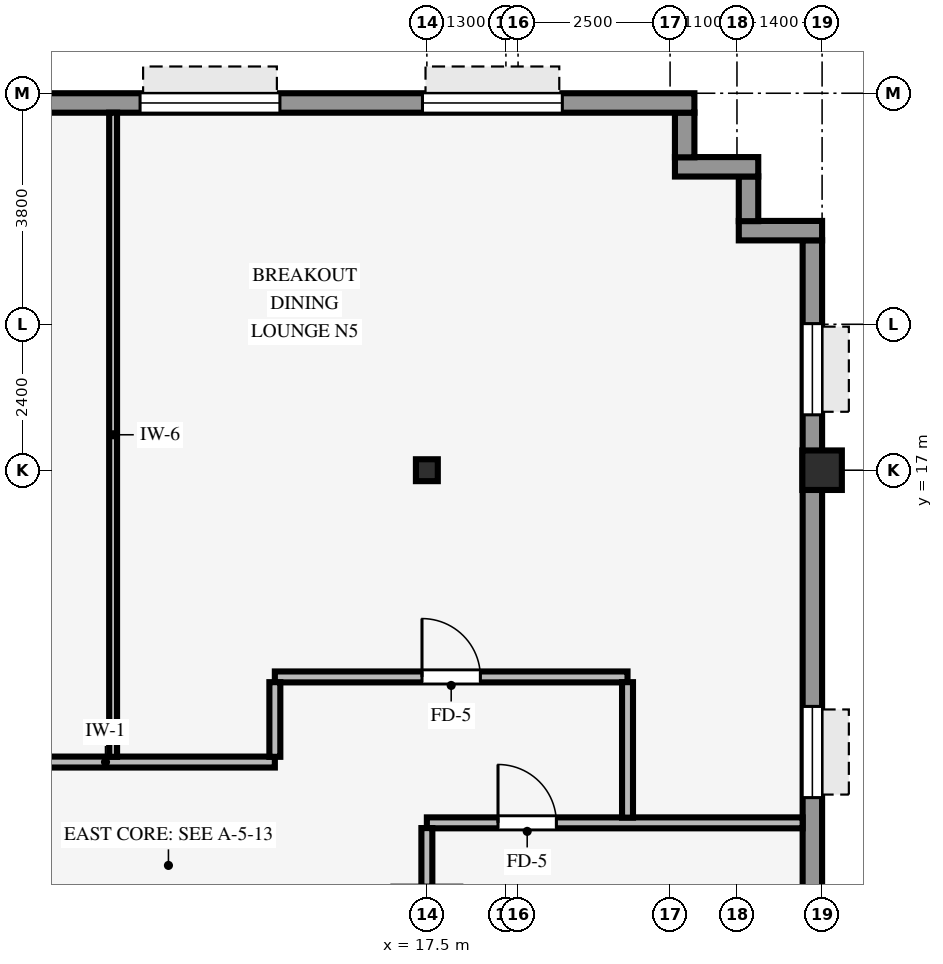
"""IFC4 building model, lengths in metres.
Left out: names, types, materials, properties, quantities, classifications, styles, units other than length and angle.
Written with IfcOpenShell. Run it as: python <this file> out.ifc"""

import sys

from ifc_helpers import new_model, si_unit, direction, frame, frame_2d, origin, origin_2d, place, context, subcontext, project, spatial, rectangle, hollow_rectangle, i_section, extrude, source, transform, mapped, element, fill, save


model = new_model("IFC4")
c1 = context("Model", 3, precision=1e-05, world=origin(), true_north=direction((0.0, 1.0)))
c2 = subcontext(c1, "Body", "Model", "MODEL_VIEW")
j1 = project(units=[si_unit("LENGTHUNIT", "METRE"), si_unit("PLANEANGLEUNIT", "RADIAN")], contexts=[c1])
p1 = place(None, origin())
s1 = spatial("IfcSite", under=j1, at=p1, CompositionType="ELEMENT")
p2 = place(p1, origin())
s2 = spatial("IfcBuilding", under=s1, at=p2, CompositionType="ELEMENT")
p3 = place(p2, frame((0.0, 0.0, 98.3)))
s3 = spatial("IfcBuildingStorey", under=s2, at=p3, CompositionType="ELEMENT", Elevation=98.3)
p4 = place(p3, frame((24.0, 17.0, 0.0), z_axis=(0.0, 0.0, 1.0), x_axis=(1.0, 0.0, 0.0)))
e1 = element("IfcColumn", 1, at=p4, inside=s3, PredefinedType="COLUMN", context=c2, shape_type="SweptSolid", body=[
    extrude(hollow_rectangle(XDim=0.65, YDim=0.65, WallThickness=0.04, InnerFilletRadius=0.04, OuterFilletRadius=0.08, at=origin_2d()), origin(), (0.0, 0.0, 1.0), 3.37),
])
p5 = place(p3, frame((17.5, 17.0, 0.0), z_axis=(0.0, 0.0, 1.0), x_axis=(1.0, 0.0, 0.0)))
e2 = element("IfcColumn", 2, at=p5, inside=s3, PredefinedType="COLUMN", context=c2, shape_type="SweptSolid", body=[
    extrude(i_section(OverallWidth=0.36, OverallDepth=0.36, WebThickness=0.021, FlangeThickness=0.021, FilletRadius=0.018, at=origin_2d()), origin(), (0.0, 0.0, 1.0), 3.37),
])
p6 = place(p3, frame((23.84, -20.784, 0.0), z_axis=(0.0, 0.0, 1.0), x_axis=(0.0, 1.0, 0.0)))
e3 = element("IfcWall", 3, at=p6, inside=s3, PredefinedType="STANDARD", context=c2, shape_type="SweptSolid", body=[
    extrude(rectangle(XDim=41.568, YDim=0.32, at=frame_2d((20.784, 0.0))), origin(), (0.0, 0.0, 1.0), 2.705),
])
p7 = place(p6, frame((1.373, 0.0, 0.8)))
e4 = element("IfcOpeningElement", 4, at=p7, cuts=e3, PredefinedType="OPENING", context=c2, shape_type="SweptSolid", body=[
    extrude(rectangle(XDim=1.5, YDim=1.6, at=frame_2d((0.75, 0.8))), frame((0.0, 0.17, 0.0), z_axis=(0.0, -1.0, 0.0), x_axis=(1.0, 0.0, 0.0)), (0.0, 0.0, 1.0), 0.34),
])
p8 = place(p6, frame((7.669, 0.0, 0.8)))
e5 = element("IfcOpeningElement", 5, at=p8, cuts=e3, PredefinedType="OPENING", context=c2, shape_type="SweptSolid", body=[
    extrude(rectangle(XDim=1.5, YDim=1.6, at=frame_2d((0.75, 0.8))), frame((0.0, 0.17, 0.0), z_axis=(0.0, -1.0, 0.0), x_axis=(1.0, 0.0, 0.0)), (0.0, 0.0, 1.0), 0.34),
])
p9 = place(p6, frame((12.615, 0.0, 0.8)))
e6 = element("IfcOpeningElement", 6, at=p9, cuts=e3, PredefinedType="OPENING", context=c2, shape_type="SweptSolid", body=[
    extrude(rectangle(XDim=1.5, YDim=1.6, at=frame_2d((0.75, 0.8))), frame((0.0, 0.17, 0.0), z_axis=(0.0, -1.0, 0.0), x_axis=(1.0, 0.0, 0.0)), (0.0, 0.0, 1.0), 0.34),
])
p10 = place(p6, frame((17.561, 0.0, 0.8)))
e7 = element("IfcOpeningElement", 7, at=p10, cuts=e3, PredefinedType="OPENING", context=c2, shape_type="SweptSolid", body=[
    extrude(rectangle(XDim=1.5, YDim=1.6, at=frame_2d((0.75, 0.8))), frame((0.0, 0.17, 0.0), z_axis=(0.0, -1.0, 0.0), x_axis=(1.0, 0.0, 0.0)), (0.0, 0.0, 1.0), 0.34),
])
p11 = place(p6, frame((22.507, 0.0, 0.8)))
e8 = element("IfcOpeningElement", 8, at=p11, cuts=e3, PredefinedType="OPENING", context=c2, shape_type="SweptSolid", body=[
    extrude(rectangle(XDim=1.5, YDim=1.6, at=frame_2d((0.75, 0.8))), frame((0.0, 0.17, 0.0), z_axis=(0.0, -1.0, 0.0), x_axis=(1.0, 0.0, 0.0)), (0.0, 0.0, 1.0), 0.34),
])
p12 = place(p6, frame((27.453, 0.0, 0.8)))
e9 = element("IfcOpeningElement", 9, at=p12, cuts=e3, PredefinedType="OPENING", context=c2, shape_type="SweptSolid", body=[
    extrude(rectangle(XDim=1.5, YDim=1.6, at=frame_2d((0.75, 0.8))), frame((0.0, 0.17, 0.0), z_axis=(0.0, -1.0, 0.0), x_axis=(1.0, 0.0, 0.0)), (0.0, 0.0, 1.0), 0.34),
])
p13 = place(p6, frame((32.399, 0.0, 0.8)))
e10 = element("IfcOpeningElement", 10, at=p13, cuts=e3, PredefinedType="OPENING", context=c2, shape_type="SweptSolid", body=[
    extrude(rectangle(XDim=1.5, YDim=1.6, at=frame_2d((0.75, 0.8))), frame((0.0, 0.17, 0.0), z_axis=(0.0, -1.0, 0.0), x_axis=(1.0, 0.0, 0.0)), (0.0, 0.0, 1.0), 0.34),
])
p14 = place(p6, frame((38.695, 0.0, 0.8)))
e11 = element("IfcOpeningElement", 11, at=p14, cuts=e3, PredefinedType="OPENING", context=c2, shape_type="SweptSolid", body=[
    extrude(rectangle(XDim=1.5, YDim=1.6, at=frame_2d((0.75, 0.8))), frame((0.0, 0.17, 0.0), z_axis=(0.0, -1.0, 0.0), x_axis=(1.0, 0.0, 0.0)), (0.0, 0.0, 1.0), 0.34),
])
p15 = place(p3, frame((22.63, 20.94, 0.0), z_axis=(0.0, 0.0, 1.0), x_axis=(1.0, 0.0, 0.0)))
e12 = element("IfcWall", 12, at=p15, inside=s3, PredefinedType="STANDARD", context=c2, shape_type="SweptSolid", body=[
    extrude(rectangle(XDim=1.37, YDim=0.32, at=frame_2d((0.685, 0.0))), origin(), (0.0, 0.0, 1.0), 3.36),
])
p16 = place(p3, frame((22.79, 21.096, 0.0), z_axis=(0.0, 0.0, 1.0), x_axis=(0.0, 1.0, 0.0)))
e13 = element("IfcWall", 13, at=p16, inside=s3, PredefinedType="STANDARD", context=c2, shape_type="SweptSolid", body=[
    extrude(rectangle(XDim=0.738, YDim=0.32, at=frame_2d((0.369, 0.0))), origin(), (0.0, 0.0, 1.0), 3.36),
])
p17 = place(p3, frame((21.58, 21.99, 0.0), z_axis=(0.0, 0.0, 1.0), x_axis=(1.0, 0.0, 0.0)))
e14 = element("IfcWall", 14, at=p17, inside=s3, PredefinedType="STANDARD", context=c2, shape_type="SweptSolid", body=[
    extrude(rectangle(XDim=1.37, YDim=0.32, at=frame_2d((0.685, 0.0))), origin(), (0.0, 0.0, 1.0), 3.36),
])
p18 = place(p3, frame((21.74, 22.146, 0.0), z_axis=(0.0, 0.0, 1.0), x_axis=(0.0, 1.0, 0.0)))
e15 = element("IfcWall", 15, at=p18, inside=s3, PredefinedType="STANDARD", context=c2, shape_type="SweptSolid", body=[
    extrude(rectangle(XDim=0.738, YDim=0.32, at=frame_2d((0.369, 0.0))), origin(), (0.0, 0.0, 1.0), 3.36),
])
p19 = place(p3, frame((-21.9, 23.04, 0.0), z_axis=(0.0, 0.0, 1.0), x_axis=(1.0, 0.0, 0.0)))
e16 = element("IfcWall", 16, at=p19, inside=s3, PredefinedType="STANDARD", context=c2, shape_type="SweptSolid", body=[
    extrude(rectangle(XDim=43.8, YDim=0.32, at=frame_2d((21.9, 0.0))), origin(), (0.0, 0.0, 1.0), 2.705),
])
p20 = place(p19, frame((26.85, 0.0, 0.0)))
e17 = element("IfcOpeningElement", 17, at=p20, cuts=e16, PredefinedType="OPENING", context=c2, shape_type="SweptSolid", body=[
    extrude(rectangle(XDim=1.05, YDim=2.1, at=frame_2d((0.525, 1.05))), frame((0.0, 0.17, 0.0), z_axis=(0.0, -1.0, 0.0), x_axis=(1.0, 0.0, 0.0)), (0.0, 0.0, 1.0), 0.34),
])
p21 = place(p19, frame((2.172, 0.0, 0.8)))
e18 = element("IfcOpeningElement", 18, at=p21, cuts=e16, PredefinedType="OPENING", context=c2, shape_type="SweptSolid", body=[
    extrude(rectangle(XDim=2.3, YDim=1.62, at=frame_2d((1.15, 0.81))), frame((0.0, 0.17, 0.0), z_axis=(0.0, -1.0, 0.0), x_axis=(1.0, 0.0, 0.0)), (0.0, 0.0, 1.0), 0.34),
])
p22 = place(p19, frame((5.917, 0.0, 0.8)))
e19 = element("IfcOpeningElement", 19, at=p22, cuts=e16, PredefinedType="OPENING", context=c2, shape_type="SweptSolid", body=[
    extrude(rectangle(XDim=2.3, YDim=1.62, at=frame_2d((1.15, 0.81))), frame((0.0, 0.17, 0.0), z_axis=(0.0, -1.0, 0.0), x_axis=(1.0, 0.0, 0.0)), (0.0, 0.0, 1.0), 0.34),
])
p23 = place(p19, frame((16.106, 0.0, 0.8)))
e20 = element("IfcOpeningElement", 20, at=p23, cuts=e16, PredefinedType="OPENING", context=c2, shape_type="SweptSolid", body=[
    extrude(rectangle(XDim=2.3, YDim=1.62, at=frame_2d((1.15, 0.81))), frame((0.0, 0.17, 0.0), z_axis=(0.0, -1.0, 0.0), x_axis=(1.0, 0.0, 0.0)), (0.0, 0.0, 1.0), 0.34),
])
p24 = place(p19, frame((34.683, 0.0, 0.8)))
e21 = element("IfcOpeningElement", 21, at=p24, cuts=e16, PredefinedType="OPENING", context=c2, shape_type="SweptSolid", body=[
    extrude(rectangle(XDim=2.3, YDim=1.62, at=frame_2d((1.15, 0.81))), frame((0.0, 0.17, 0.0), z_axis=(0.0, -1.0, 0.0), x_axis=(1.0, 0.0, 0.0)), (0.0, 0.0, 1.0), 0.34),
])
p25 = place(p19, frame((39.328, 0.0, 0.8)))
e22 = element("IfcOpeningElement", 22, at=p25, cuts=e16, PredefinedType="OPENING", context=c2, shape_type="SweptSolid", body=[
    extrude(rectangle(XDim=2.3, YDim=1.62, at=frame_2d((1.15, 0.81))), frame((0.0, 0.17, 0.0), z_axis=(0.0, -1.0, 0.0), x_axis=(1.0, 0.0, 0.0)), (0.0, 0.0, 1.0), 0.34),
])
p26 = place(p3, frame((17.5, 11.2, 0.0), z_axis=(0.0, 0.0, 1.0), x_axis=(1.0, 0.0, 0.0)))
e23 = element("IfcWall", 23, at=p26, inside=s3, PredefinedType="PARTITIONING", context=c2, shape_type="SweptSolid", body=[
    extrude(rectangle(XDim=6.18, YDim=0.18, at=frame_2d((3.09, 0.0))), origin(), (0.0, 0.0, 1.0), 3.36),
])
p27 = place(p26, frame((1.17, 0.0, 0.0)))
e24 = element("IfcOpeningElement", 24, at=p27, cuts=e23, PredefinedType="OPENING", context=c2, shape_type="SweptSolid", body=[
    extrude(rectangle(XDim=0.96, YDim=2.1, at=frame_2d((0.48, 1.05))), frame((0.0, 0.1, 0.0), z_axis=(0.0, -1.0, 0.0), x_axis=(1.0, 0.0, 0.0)), (0.0, 0.0, 1.0), 0.2),
])
p28 = place(p3, frame((-15.0, 12.2, 0.0), z_axis=(0.0, 0.0, 1.0), x_axis=(1.0, 0.0, 0.0)))
e25 = element("IfcWall", 25, at=p28, inside=s3, PredefinedType="PARTITIONING", context=c2, shape_type="SweptSolid", body=[
    extrude(rectangle(XDim=30.0, YDim=0.18, at=frame_2d((15.0, 0.0))), origin(), (0.0, 0.0, 1.0), 3.36),
])
p29 = place(p28, frame((23.02, 0.0, 0.0)))
e26 = element("IfcOpeningElement", 26, at=p29, cuts=e25, PredefinedType="OPENING", context=c2, shape_type="SweptSolid", body=[
    extrude(rectangle(XDim=0.96, YDim=2.1, at=frame_2d((0.48, 1.05))), frame((0.0, 0.1, 0.0), z_axis=(0.0, -1.0, 0.0), x_axis=(1.0, 0.0, 0.0)), (0.0, 0.0, 1.0), 0.2),
])
p30 = place(p28, frame((16.45, 0.0, 0.0)))
e27 = element("IfcOpeningElement", 27, at=p30, cuts=e25, PredefinedType="OPENING", context=c2, shape_type="SweptSolid", body=[
    extrude(rectangle(XDim=0.96, YDim=2.1, at=frame_2d((0.48, 1.05))), frame((0.0, 0.1, 0.0), z_axis=(0.0, -1.0, 0.0), x_axis=(1.0, 0.0, 0.0)), (0.0, 0.0, 1.0), 0.2),
])
p31 = place(p28, frame((5.45, 0.0, 0.0)))
e28 = element("IfcOpeningElement", 28, at=p31, cuts=e25, PredefinedType="OPENING", context=c2, shape_type="SweptSolid", body=[
    extrude(rectangle(XDim=0.9, YDim=2.1, at=frame_2d((0.45, 1.05))), frame((0.0, 0.1, 0.0), z_axis=(0.0, -1.0, 0.0), x_axis=(1.0, 0.0, 0.0)), (0.0, 0.0, 1.0), 0.2),
])
p32 = place(p28, frame((2.85, 0.0, 0.0)))
e29 = element("IfcOpeningElement", 29, at=p32, cuts=e25, PredefinedType="OPENING", context=c2, shape_type="SweptSolid", body=[
    extrude(rectangle(XDim=0.9, YDim=2.1, at=frame_2d((0.45, 1.05))), frame((0.0, 0.1, 0.0), z_axis=(0.0, -1.0, 0.0), x_axis=(1.0, 0.0, 0.0)), (0.0, 0.0, 1.0), 0.2),
])
p33 = place(p28, frame((12.52, 0.0, 0.0)))
e30 = element("IfcOpeningElement", 30, at=p33, cuts=e25, PredefinedType="OPENING", context=c2, shape_type="SweptSolid", body=[
    extrude(rectangle(XDim=0.96, YDim=2.1, at=frame_2d((0.48, 1.05))), frame((0.0, 0.1, 0.0), z_axis=(0.0, -1.0, 0.0), x_axis=(1.0, 0.0, 0.0)), (0.0, 0.0, 1.0), 0.2),
])
p34 = place(p28, frame((7.95, 0.0, 0.0)))
e31 = element("IfcOpeningElement", 31, at=p34, cuts=e25, PredefinedType="OPENING", context=c2, shape_type="SweptSolid", body=[
    extrude(rectangle(XDim=0.9, YDim=2.1, at=frame_2d((0.45, 1.05))), frame((0.0, 0.1, 0.0), z_axis=(0.0, -1.0, 0.0), x_axis=(1.0, 0.0, 0.0)), (0.0, 0.0, 1.0), 0.2),
])
p35 = place(p3, frame((15.0, 13.6, 0.0), z_axis=(0.0, 0.0, 1.0), x_axis=(1.0, 0.0, 0.0)))
e32 = element("IfcWall", 32, at=p35, inside=s3, PredefinedType="PARTITIONING", context=c2, shape_type="SweptSolid", body=[
    extrude(rectangle(XDim=5.8, YDim=0.18, at=frame_2d((2.9, 0.0))), origin(), (0.0, 0.0, 1.0), 2.998),
])
p36 = place(p35, frame((2.42, 0.0, 0.0)))
e33 = element("IfcOpeningElement", 33, at=p36, cuts=e32, PredefinedType="OPENING", context=c2, shape_type="SweptSolid", body=[
    extrude(rectangle(XDim=0.96, YDim=2.1, at=frame_2d((0.48, 1.05))), frame((0.0, 0.1, 0.0), z_axis=(0.0, -1.0, 0.0), x_axis=(1.0, 0.0, 0.0)), (0.0, 0.0, 1.0), 0.2),
])
p37 = place(p3, frame((12.34, 12.286, 0.0), z_axis=(0.0, 0.0, 1.0), x_axis=(0.0, 1.0, 0.0)))
e34 = element("IfcWall", 34, at=p37, inside=s3, PredefinedType="PARTITIONING", context=c2, shape_type="SweptSolid", body=[
    extrude(rectangle(XDim=10.594, YDim=0.13, at=frame_2d((5.297, 0.0))), origin(), (0.0, 0.0, 1.0), 3.36),
])
p38 = place(p3, frame((15.0, 12.286, 0.0), z_axis=(0.0, 0.0, 1.0), x_axis=(0.0, 1.0, 0.0)))
e35 = element("IfcWall", 35, at=p38, inside=s3, PredefinedType="PARTITIONING", context=c2, shape_type="SweptSolid", body=[
    extrude(rectangle(XDim=1.228, YDim=0.18, at=frame_2d((0.614, 0.0))), origin(), (0.0, 0.0, 1.0), 3.36),
])
p39 = place(p3, frame((17.5, 10.146, 0.0), z_axis=(0.0, 0.0, 1.0), x_axis=(0.0, 1.0, 0.0)))
e36 = element("IfcWall", 36, at=p39, inside=s3, PredefinedType="PARTITIONING", context=c2, shape_type="SweptSolid", body=[
    extrude(rectangle(XDim=0.968, YDim=0.18, at=frame_2d((0.484, 0.0))), origin(), (0.0, 0.0, 1.0), 2.738),
])
p40 = place(p3, frame((20.8, 11.286, 0.0), z_axis=(0.0, 0.0, 1.0), x_axis=(0.0, 1.0, 0.0)))
e37 = element("IfcWall", 37, at=p40, inside=s3, PredefinedType="PARTITIONING", context=c2, shape_type="SweptSolid", body=[
    extrude(rectangle(XDim=2.228, YDim=0.18, at=frame_2d((1.114, 0.0))), origin(), (0.0, 0.0, 1.0), 3.36),
])
m1 = source(origin(), c2, "Body", "SweptSolid", [
    extrude(rectangle(XDim=1.5, YDim=1.6, at=frame_2d((0.75, 0.8))), frame((0.0, 0.03, 0.0), z_axis=(0.0, -1.0, 0.0), x_axis=(1.0, 0.0, 0.0)), (0.0, 0.0, 1.0), 0.06),
])
p41 = place(p13, origin())
e38 = element("IfcWindow", 38, at=p41, inside=s3, PartitioningType="SINGLE_PANEL", PredefinedType="WINDOW", context=c2, shape_type="MappedRepresentation", body=[
    mapped(m1, transform((0.0, 0.0, 0.0), scale=1.0)),
])
fill(e10, e38)
p42 = place(p14, origin())
e39 = element("IfcWindow", 39, at=p42, inside=s3, PartitioningType="SINGLE_PANEL", PredefinedType="WINDOW", context=c2, shape_type="MappedRepresentation", body=[
    mapped(m1, transform((0.0, 0.0, 0.0), scale=1.0)),
])
fill(e11, e39)
m2 = source(origin(), c2, "Body", "SweptSolid", [
    extrude(rectangle(XDim=2.3, YDim=1.62, at=frame_2d((1.15, 0.81))), frame((0.0, 0.03, 0.0), z_axis=(0.0, -1.0, 0.0), x_axis=(1.0, 0.0, 0.0)), (0.0, 0.0, 1.0), 0.06),
])
p43 = place(p24, origin())
e40 = element("IfcWindow", 40, at=p43, inside=s3, PartitioningType="SINGLE_PANEL", PredefinedType="WINDOW", context=c2, shape_type="MappedRepresentation", body=[
    mapped(m2, transform((0.0, 0.0, 0.0), scale=1.0)),
])
fill(e21, e40)
p44 = place(p25, origin())
e41 = element("IfcWindow", 41, at=p44, inside=s3, PartitioningType="SINGLE_PANEL", PredefinedType="WINDOW", context=c2, shape_type="MappedRepresentation", body=[
    mapped(m2, transform((0.0, 0.0, 0.0), scale=1.0)),
])
fill(e22, e41)
m3 = source(origin(), c2, "Body", "SweptSolid", [
    extrude(rectangle(XDim=0.96, YDim=2.1, at=frame_2d((0.48, 1.05))), frame((0.0, 0.025, 0.0), z_axis=(0.0, -1.0, 0.0), x_axis=(1.0, 0.0, 0.0)), (0.0, 0.0, 1.0), 0.05),
])
p45 = place(p36, origin())
e42 = element("IfcDoor", 42, at=p45, inside=s3, OperationType="SINGLE_SWING_LEFT", PredefinedType="DOOR", context=c2, shape_type="MappedRepresentation", body=[
    mapped(m3, transform((0.0, 0.0, 0.0), scale=1.0)),
])
fill(e33, e42)
p46 = place(p27, origin())
e43 = element("IfcDoor", 43, at=p46, inside=s3, OperationType="SINGLE_SWING_LEFT", PredefinedType="DOOR", context=c2, shape_type="MappedRepresentation", body=[
    mapped(m3, transform((0.0, 0.0, 0.0), scale=1.0)),
])
fill(e24, e43)
save(model, sys.argv[1])
